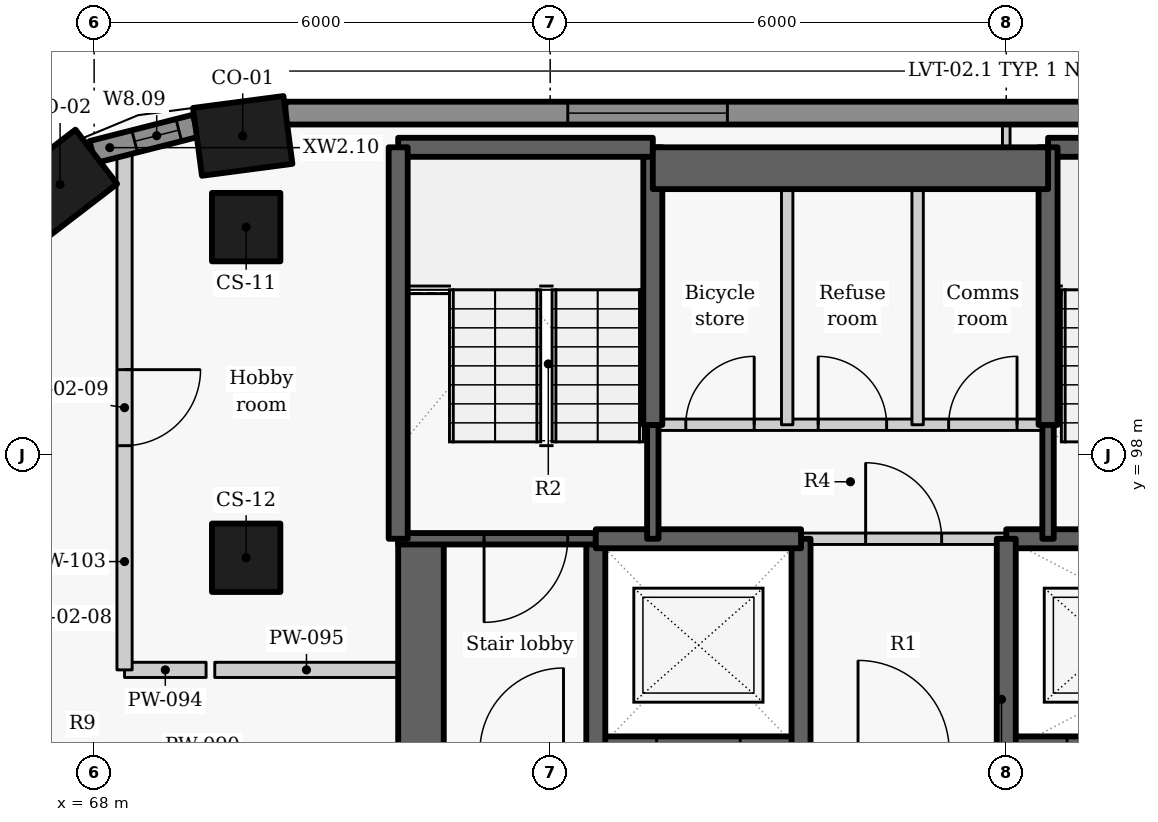
"""IFC4 building model, lengths in metres.
Left out: names, types, materials, properties, quantities, classifications, styles, units other than length and angle.
Written with IfcOpenShell. Run it as: python <this file> out.ifc"""

import sys

from ifc_helpers import new_model, si_unit, direction, frame, frame_2d, origin, origin_2d, place, context, subcontext, project, spatial, rectangle, extrude, element, fill, save


model = new_model("IFC4")
c1 = context("Model", 3, precision=1e-05, world=origin(), true_north=direction((0.0, 1.0)))
c2 = subcontext(c1, "Body", "Model", "MODEL_VIEW")
j1 = project(units=[si_unit("LENGTHUNIT", "METRE"), si_unit("PLANEANGLEUNIT", "RADIAN")], contexts=[c1])
p1 = place(None, origin())
s1 = spatial("IfcSite", under=j1, at=p1, CompositionType="ELEMENT")
p2 = place(p1, origin())
s2 = spatial("IfcBuilding", under=s1, at=p2, CompositionType="ELEMENT")
p3 = place(p2, frame((0.0, 0.0, 180.0)))
s3 = spatial("IfcBuildingStorey", under=s2, at=p3, CompositionType="ELEMENT", Elevation=180.0)
for number, where, z_axis, x_axis in (
    (1, (69.955, 102.2, 0.0), (0.0, 0.0, 1.0), (-0.991, -0.131, 0.0)),
    (2, (67.552, 101.56, 0.0), (0.0, 0.0, 1.0), (-0.793, -0.609, 0.0)),
):
    element("IfcColumn", number, at=place(p3, frame(where, z_axis=z_axis, x_axis=x_axis)), inside=s3, PredefinedType="COLUMN", context=c2, shape_type="SweptSolid", body=[
        extrude(rectangle(XDim=1.2, YDim=0.9, at=origin_2d()), origin(), (0.0, 0.0, 1.0), 3.3),
    ])
for number, where, z_axis, x_axis in (
    (3, (70.0, 101.0, 0.0), (0.0, 0.0, 1.0), (0.0, -1.0, 0.0)),
    (4, (70.0, 96.65, 0.0), (0.0, 0.0, 1.0), (0.0, -1.0, 0.0)),
):
    element("IfcColumn", number, at=place(p3, frame(where, z_axis=z_axis, x_axis=x_axis)), inside=s3, PredefinedType="COLUMN", context=c2, shape_type="SweptSolid", body=[
        extrude(rectangle(XDim=0.9, YDim=0.9, at=origin_2d()), origin(), (0.0, 0.0, 1.0), 3.3),
    ])
p4 = place(p3, frame((89.449, 102.5, 0.0), z_axis=(0.0, 0.0, 1.0), x_axis=(-1.0, 0.0, 0.0)))
e5 = element("IfcWall", 5, at=p4, inside=s3, PredefinedType="SOLIDWALL", context=c2, shape_type="SweptSolid", body=[
    extrude(rectangle(XDim=18.933, YDim=0.3, at=frame_2d((9.466, 0.0))), origin(), (0.0, 0.0, 1.0), 2.425),
])
p5 = place(p4, frame((3.687, 0.0, 0.9)))
e6 = element("IfcOpeningElement", 6, at=p5, cuts=e5, PredefinedType="OPENING", context=c2, shape_type="SweptSolid", body=[
    extrude(rectangle(XDim=2.1, YDim=1.1, at=frame_2d((1.05, 0.55))), frame((0.0, 0.16, 0.0), z_axis=(0.0, -1.0, 0.0), x_axis=(1.0, 0.0, 0.0)), (0.0, 0.0, 1.0), 0.32),
])
p6 = place(p4, frame((13.118, 0.0, 0.9)))
e7 = element("IfcOpeningElement", 7, at=p6, cuts=e5, PredefinedType="OPENING", context=c2, shape_type="SweptSolid", body=[
    extrude(rectangle(XDim=2.1, YDim=1.1, at=frame_2d((1.05, 0.55))), frame((0.0, 0.16, 0.0), z_axis=(0.0, -1.0, 0.0), x_axis=(1.0, 0.0, 0.0)), (0.0, 0.0, 1.0), 0.32),
])
p7 = place(p3, frame((69.336, 102.333, 0.0), z_axis=(0.0, 0.0, 1.0), x_axis=(-0.969037396898, -0.246914000036, 0.0)))
e8 = element("IfcWall", 8, at=p7, inside=s3, PredefinedType="SOLIDWALL", context=c2, shape_type="SweptSolid", body=[
    extrude(rectangle(XDim=1.403, YDim=0.3, at=frame_2d((0.702, 0.0))), origin(), (0.0, 0.0, 1.0), 2.425),
])
p8 = place(p7, frame((0.229, 0.0, 0.9)))
e9 = element("IfcOpeningElement", 9, at=p8, cuts=e8, PredefinedType="OPENING", context=c2, shape_type="SweptSolid", body=[
    extrude(rectangle(XDim=0.6, YDim=1.1, at=frame_2d((0.3, 0.55))), frame((0.0, 0.16, 0.0), z_axis=(0.0, -1.0, 0.0), x_axis=(1.0, 0.0, 0.0)), (0.0, 0.0, 1.0), 0.32),
])
p9 = place(p3, frame((72.3, 87.8, -0.275), z_axis=(0.0, 0.0, 1.0), x_axis=(0.0, 1.0, 0.0)))
e10 = element("IfcWall", 10, at=p9, inside=s3, PredefinedType="SHEAR", context=c2, shape_type="SweptSolid", body=[
    extrude(rectangle(XDim=9.1, YDim=0.6, at=frame_2d((4.55, 0.0))), origin(), (0.0, 0.0, 1.0), 3.3),
])
p10 = place(p9, frame((3.852, 0.0, 0.275)))
e11 = element("IfcOpeningElement", 11, at=p10, cuts=e10, PredefinedType="OPENING", context=c2, shape_type="SweptSolid", body=[
    extrude(rectangle(XDim=1.5, YDim=2.1, at=frame_2d((0.75, 1.05))), frame((0.0, 0.31, 0.0), z_axis=(0.0, -1.0, 0.0), x_axis=(1.0, 0.0, 0.0)), (0.0, 0.0, 1.0), 0.62),
])
p11 = place(p3, frame((74.597, 94.1, -0.275), z_axis=(0.0, 0.0, 1.0), x_axis=(1.0, 0.0, 0.0)))
e12 = element("IfcWall", 12, at=p11, inside=s3, PredefinedType="SHEAR", context=c2, shape_type="SweptSolid", body=[
    extrude(rectangle(XDim=2.706, YDim=0.4, at=frame_2d((1.353, 0.0))), origin(), (0.0, 0.0, 1.0), 3.3),
])
p12 = place(p11, frame((0.803, 0.0, 0.275)))
e13 = element("IfcOpeningElement", 13, at=p12, cuts=e12, PredefinedType="OPENING", context=c2, shape_type="SweptSolid", body=[
    extrude(rectangle(XDim=1.1, YDim=2.1, at=frame_2d((0.55, 1.05))), frame((0.0, 0.21, 0.0), z_axis=(0.0, -1.0, 0.0), x_axis=(1.0, 0.0, 0.0)), (0.0, 0.0, 1.0), 0.42),
])
p13 = place(p3, frame((79.997, 94.1, -0.275), z_axis=(0.0, 0.0, 1.0), x_axis=(1.0, 0.0, 0.0)))
e14 = element("IfcWall", 14, at=p13, inside=s3, PredefinedType="SHEAR", context=c2, shape_type="SweptSolid", body=[
    extrude(rectangle(XDim=5.406, YDim=0.4, at=frame_2d((2.703, 0.0))), origin(), (0.0, 0.0, 1.0), 3.3),
])
p14 = place(p13, frame((0.803, 0.0, 0.275)))
e15 = element("IfcOpeningElement", 15, at=p14, cuts=e14, PredefinedType="OPENING", context=c2, shape_type="SweptSolid", body=[
    extrude(rectangle(XDim=1.1, YDim=2.1, at=frame_2d((0.55, 1.05))), frame((0.0, 0.21, 0.0), z_axis=(0.0, -1.0, 0.0), x_axis=(1.0, 0.0, 0.0)), (0.0, 0.0, 1.0), 0.42),
])
p15 = place(p3, frame((74.6, 94.1, -0.275), z_axis=(0.0, 0.0, 1.0), x_axis=(0.0, 1.0, 0.0)))
e16 = element("IfcWall", 16, at=p15, inside=s3, PredefinedType="SHEAR", context=c2, shape_type="SweptSolid", body=[
    extrude(rectangle(XDim=2.8, YDim=0.25, at=frame_2d((1.4, 0.0))), origin(), (0.0, 0.0, 1.0), 3.3),
])
p16 = place(p3, frame((74.6, 96.9, -0.275), z_axis=(0.0, 0.0, 1.0), x_axis=(-1.0, 0.0, 0.0)))
e17 = element("IfcWall", 17, at=p16, inside=s3, PredefinedType="SHEAR", context=c2, shape_type="SweptSolid", body=[
    extrude(rectangle(XDim=2.6, YDim=0.15, at=frame_2d((1.3, 0.0))), origin(), (0.0, 0.0, 1.0), 3.3),
])
p17 = place(p16, frame((0.37, 0.0, 0.275)))
e18 = element("IfcOpeningElement", 18, at=p17, cuts=e17, PredefinedType="OPENING", context=c2, shape_type="SweptSolid", body=[
    extrude(rectangle(XDim=1.1, YDim=2.1, at=frame_2d((0.55, 1.05))), frame((0.0, 0.085, 0.0), z_axis=(0.0, -1.0, 0.0), x_axis=(1.0, 0.0, 0.0)), (0.0, 0.0, 1.0), 0.17),
])
p18 = place(p3, frame((77.3, 94.1, -0.275), z_axis=(0.0, 0.0, 1.0), x_axis=(0.0, 1.0, 0.0)))
e19 = element("IfcWall", 19, at=p18, inside=s3, PredefinedType="SHEAR", context=c2, shape_type="SweptSolid", body=[
    extrude(rectangle(XDim=2.8, YDim=0.25, at=frame_2d((1.4, 0.0))), origin(), (0.0, 0.0, 1.0), 3.3),
])
p19 = place(p3, frame((74.6, 96.9, -0.275), z_axis=(0.0, 0.0, 1.0), x_axis=(1.0, 0.0, 0.0)))
e20 = element("IfcWall", 20, at=p19, inside=s3, PredefinedType="SHEAR", context=c2, shape_type="SweptSolid", body=[
    extrude(rectangle(XDim=2.7, YDim=0.25, at=frame_2d((1.35, 0.0))), origin(), (0.0, 0.0, 1.0), 3.3),
])
p20 = place(p3, frame((80.0, 96.9, -0.275), z_axis=(0.0, 0.0, 1.0), x_axis=(1.0, 0.0, 0.0)))
e21 = element("IfcWall", 21, at=p20, inside=s3, PredefinedType="SHEAR", context=c2, shape_type="SweptSolid", body=[
    extrude(rectangle(XDim=8.0, YDim=0.25, at=frame_2d((4.0, 0.0))), origin(), (0.0, 0.0, 1.0), 3.3),
])
p21 = place(p20, frame((3.849, 0.0, 0.275)))
e22 = element("IfcOpeningElement", 22, at=p21, cuts=e21, PredefinedType="OPENING", context=c2, shape_type="SweptSolid", body=[
    extrude(rectangle(XDim=1.1, YDim=2.1, at=frame_2d((0.55, 1.05))), frame((0.0, 0.135, 0.0), z_axis=(0.0, -1.0, 0.0), x_axis=(1.0, 0.0, 0.0)), (0.0, 0.0, 1.0), 0.27),
])
p22 = place(p3, frame((80.0, 94.1, -0.275), z_axis=(0.0, 0.0, 1.0), x_axis=(0.0, 1.0, 0.0)))
e23 = element("IfcWall", 23, at=p22, inside=s3, PredefinedType="SHEAR", context=c2, shape_type="SweptSolid", body=[
    extrude(rectangle(XDim=2.8, YDim=0.25, at=frame_2d((1.4, 0.0))), origin(), (0.0, 0.0, 1.0), 3.3),
])
p23 = place(p3, frame((77.3, 96.9, 0.0), z_axis=(0.0, 0.0, 1.0), x_axis=(1.0, 0.0, 0.0)))
e24 = element("IfcWall", 24, at=p23, inside=s3, PredefinedType="PARTITIONING", context=c2, shape_type="SweptSolid", body=[
    extrude(rectangle(XDim=2.7, YDim=0.15, at=frame_2d((1.35, 0.0))), origin(), (0.0, 0.0, 1.0), 3.025),
])
p24 = place(p23, frame((0.85, 0.0, 0.0)))
e25 = element("IfcOpeningElement", 25, at=p24, cuts=e24, PredefinedType="OPENING", context=c2, shape_type="SweptSolid", body=[
    extrude(rectangle(XDim=1.0, YDim=2.1, at=frame_2d((0.5, 1.05))), frame((0.0, 0.085, 0.0), z_axis=(0.0, -1.0, 0.0), x_axis=(1.0, 0.0, 0.0)), (0.0, 0.0, 1.0), 0.17),
])
p25 = place(p3, frame((75.35, 96.9, -0.275), z_axis=(0.0, 0.0, 1.0), x_axis=(0.0, 1.0, 0.0)))
e26 = element("IfcWall", 26, at=p25, inside=s3, PredefinedType="SHEAR", context=c2, shape_type="SweptSolid", body=[
    extrude(rectangle(XDim=1.503, YDim=0.15, at=frame_2d((0.751, 0.0))), origin(), (0.0, 0.0, 1.0), 3.3),
])
p26 = place(p3, frame((75.35, 98.397, -0.275), z_axis=(0.0, 0.0, 1.0), x_axis=(0.0, 1.0, 0.0)))
e27 = element("IfcWall", 27, at=p26, inside=s3, PredefinedType="SHEAR", context=c2, shape_type="SweptSolid", body=[
    extrude(rectangle(XDim=3.653, YDim=0.25, at=frame_2d((1.827, 0.0))), origin(), (0.0, 0.0, 1.0), 3.3),
])
p27 = place(p3, frame((72.0, 102.05, -0.275), z_axis=(0.0, 0.0, 1.0), x_axis=(1.0, 0.0, 0.0)))
e28 = element("IfcWall", 28, at=p27, inside=s3, PredefinedType="SHEAR", context=c2, shape_type="SweptSolid", body=[
    extrude(rectangle(XDim=3.35, YDim=0.25, at=frame_2d((1.675, 0.0))), origin(), (0.0, 0.0, 1.0), 3.3),
])
p28 = place(p3, frame((80.55, 102.05, -0.275), z_axis=(0.0, 0.0, 1.0), x_axis=(1.0, 0.0, 0.0)))
e29 = element("IfcWall", 29, at=p28, inside=s3, PredefinedType="SHEAR", context=c2, shape_type="SweptSolid", body=[
    extrude(rectangle(XDim=2.85, YDim=0.25, at=frame_2d((1.425, 0.0))), origin(), (0.0, 0.0, 1.0), 3.3),
])
p29 = place(p3, frame((72.0, 96.9, -0.275), z_axis=(0.0, 0.0, 1.0), x_axis=(0.0, 1.0, 0.0)))
e30 = element("IfcWall", 30, at=p29, inside=s3, PredefinedType="SHEAR", context=c2, shape_type="SweptSolid", body=[
    extrude(rectangle(XDim=5.15, YDim=0.25, at=frame_2d((2.575, 0.0))), origin(), (0.0, 0.0, 1.0), 3.3),
])
p30 = place(p3, frame((80.55, 96.9, -0.275), z_axis=(0.0, 0.0, 1.0), x_axis=(0.0, 1.0, 0.0)))
e31 = element("IfcWall", 31, at=p30, inside=s3, PredefinedType="SHEAR", context=c2, shape_type="SweptSolid", body=[
    extrude(rectangle(XDim=1.503, YDim=0.15, at=frame_2d((0.751, 0.0))), origin(), (0.0, 0.0, 1.0), 3.3),
])
p31 = place(p3, frame((80.55, 98.397, -0.275), z_axis=(0.0, 0.0, 1.0), x_axis=(0.0, 1.0, 0.0)))
e32 = element("IfcWall", 32, at=p31, inside=s3, PredefinedType="SHEAR", context=c2, shape_type="SweptSolid", body=[
    extrude(rectangle(XDim=3.653, YDim=0.25, at=frame_2d((1.827, 0.0))), origin(), (0.0, 0.0, 1.0), 3.3),
])
p32 = place(p3, frame((75.35, 101.775, -0.275), z_axis=(0.0, 0.0, 1.0), x_axis=(1.0, 0.0, 0.0)))
e33 = element("IfcWall", 33, at=p32, inside=s3, PredefinedType="SHEAR", context=c2, shape_type="SweptSolid", body=[
    extrude(rectangle(XDim=5.2, YDim=0.55, at=frame_2d((2.6, 0.0))), origin(), (0.0, 0.0, 1.0), 3.3),
])
p33 = place(p3, frame((75.35, 98.4, 0.0), z_axis=(0.0, 0.0, 1.0), x_axis=(1.0, 0.0, 0.0)))
e34 = element("IfcWall", 34, at=p33, inside=s3, PredefinedType="PARTITIONING", context=c2, shape_type="SweptSolid", body=[
    extrude(rectangle(XDim=5.2, YDim=0.15, at=frame_2d((2.6, 0.0))), origin(), (0.0, 0.0, 1.0), 3.025),
])
p34 = place(p33, frame((0.434, 0.0, 0.0)))
e35 = element("IfcOpeningElement", 35, at=p34, cuts=e34, PredefinedType="OPENING", context=c2, shape_type="SweptSolid", body=[
    extrude(rectangle(XDim=0.9, YDim=2.1, at=frame_2d((0.45, 1.05))), frame((0.0, 0.085, 0.0), z_axis=(0.0, -1.0, 0.0), x_axis=(1.0, 0.0, 0.0)), (0.0, 0.0, 1.0), 0.17),
])
p35 = place(p33, frame((2.176, 0.0, 0.0)))
e36 = element("IfcOpeningElement", 36, at=p35, cuts=e34, PredefinedType="OPENING", context=c2, shape_type="SweptSolid", body=[
    extrude(rectangle(XDim=0.9, YDim=2.1, at=frame_2d((0.45, 1.05))), frame((0.0, 0.085, 0.0), z_axis=(0.0, -1.0, 0.0), x_axis=(1.0, 0.0, 0.0)), (0.0, 0.0, 1.0), 0.17),
])
p36 = place(p33, frame((3.892, 0.0, 0.0)))
e37 = element("IfcOpeningElement", 37, at=p36, cuts=e34, PredefinedType="OPENING", context=c2, shape_type="SweptSolid", body=[
    extrude(rectangle(XDim=0.9, YDim=2.1, at=frame_2d((0.45, 1.05))), frame((0.0, 0.085, 0.0), z_axis=(0.0, -1.0, 0.0), x_axis=(1.0, 0.0, 0.0)), (0.0, 0.0, 1.0), 0.17),
])
for number, where, z_axis, x_axis in (
    (38, (77.118, 98.4, 0.0), (0.0, 0.0, 1.0), (0.0, 1.0, 0.0)),
    (39, (78.834, 98.4, 0.0), (0.0, 0.0, 1.0), (0.0, 1.0, 0.0)),
):
    element("IfcWall", number, at=place(p3, frame(where, z_axis=z_axis, x_axis=x_axis)), inside=s3, PredefinedType="PARTITIONING", context=c2, shape_type="SweptSolid", body=[
        extrude(rectangle(XDim=3.65, YDim=0.15, at=frame_2d((1.825, 0.0))), origin(), (0.0, 0.0, 1.0), 3.025),
    ])
p37 = place(p3, frame((68.4, 95.175, 0.0), z_axis=(0.0, 0.0, 1.0), x_axis=(1.0, 0.0, 0.0)))
e40 = element("IfcWall", 40, at=p37, inside=s3, PredefinedType="PARTITIONING", context=c2, shape_type="SweptSolid", body=[
    extrude(rectangle(XDim=1.073, YDim=0.2, at=frame_2d((0.537, 0.0))), origin(), (0.0, 0.0, 1.0), 3.025),
])
p38 = place(p3, frame((69.587, 95.175, 0.0), z_axis=(0.0, 0.0, 1.0), x_axis=(1.0, 0.0, 0.0)))
e41 = element("IfcWall", 41, at=p38, inside=s3, PredefinedType="PARTITIONING", context=c2, shape_type="SweptSolid", body=[
    extrude(rectangle(XDim=2.413, YDim=0.2, at=frame_2d((1.207, 0.0))), origin(), (0.0, 0.0, 1.0), 2.505),
])
p39 = place(p3, frame((68.4, 102.074, 0.0), z_axis=(0.0, 0.0, 1.0), x_axis=(0.0, -1.0, 0.0)))
e42 = element("IfcWall", 42, at=p39, inside=s3, PredefinedType="PARTITIONING", context=c2, shape_type="SweptSolid", body=[
    extrude(rectangle(XDim=6.899, YDim=0.2, at=frame_2d((3.449, 0.0))), origin(), (0.0, 0.0, 1.0), 2.405),
])
p40 = place(p39, frame((2.949, 0.0, 0.0)))
e43 = element("IfcOpeningElement", 43, at=p40, cuts=e42, PredefinedType="OPENING", context=c2, shape_type="SweptSolid", body=[
    extrude(rectangle(XDim=1.0, YDim=2.1, at=frame_2d((0.5, 1.05))), frame((0.0, 0.11, 0.0), z_axis=(0.0, -1.0, 0.0), x_axis=(1.0, 0.0, 0.0)), (0.0, 0.0, 1.0), 0.22),
])
p41 = place(p3, frame((80.0, 102.05, 0.0), z_axis=(0.0, 0.0, 1.0), x_axis=(0.0, 1.0, 0.0)))
e44 = element("IfcWall", 44, at=p41, inside=s3, PredefinedType="PARTITIONING", context=c2, shape_type="SweptSolid", body=[
    extrude(rectangle(XDim=0.3, YDim=0.1, at=frame_2d((0.15, 0.0))), origin(), (0.0, 0.0, 1.0), 3.025),
])
p42 = place(p6, origin())
e45 = element("IfcWindow", 45, at=p42, inside=s3, PartitioningType="SINGLE_PANEL", PredefinedType="WINDOW", context=c2, shape_type="SweptSolid", body=[
    extrude(rectangle(XDim=2.1, YDim=1.1, at=frame_2d((1.05, 0.55))), frame((0.0, 0.03, 0.0), z_axis=(0.0, -1.0, 0.0), x_axis=(1.0, 0.0, 0.0)), (0.0, 0.0, 1.0), 0.06),
])
fill(e7, e45)
p43 = place(p8, origin())
e46 = element("IfcWindow", 46, at=p43, inside=s3, PartitioningType="SINGLE_PANEL", PredefinedType="WINDOW", context=c2, shape_type="SweptSolid", body=[
    extrude(rectangle(XDim=0.6, YDim=1.1, at=frame_2d((0.3, 0.55))), frame((0.0, 0.03, 0.0), z_axis=(0.0, -1.0, 0.0), x_axis=(1.0, 0.0, 0.0)), (0.0, 0.0, 1.0), 0.06),
])
fill(e9, e46)
p44 = place(p24, origin())
e47 = element("IfcDoor", 47, at=p44, inside=s3, OperationType="SINGLE_SWING_LEFT", PredefinedType="DOOR", context=c2, shape_type="SweptSolid", body=[
    extrude(rectangle(XDim=1.0, YDim=2.1, at=frame_2d((0.5, 1.05))), frame((0.0, 0.025, 0.0), z_axis=(0.0, -1.0, 0.0), x_axis=(1.0, 0.0, 0.0)), (0.0, 0.0, 1.0), 0.05),
])
fill(e25, e47)
p45 = place(p34, origin())
e48 = element("IfcDoor", 48, at=p45, inside=s3, OperationType="SINGLE_SWING_RIGHT", PredefinedType="DOOR", context=c2, shape_type="SweptSolid", body=[
    extrude(rectangle(XDim=0.9, YDim=2.1, at=frame_2d((0.45, 1.05))), frame((0.0, 0.025, 0.0), z_axis=(0.0, -1.0, 0.0), x_axis=(1.0, 0.0, 0.0)), (0.0, 0.0, 1.0), 0.05),
])
fill(e35, e48)
p46 = place(p35, origin())
e49 = element("IfcDoor", 49, at=p46, inside=s3, OperationType="SINGLE_SWING_LEFT", PredefinedType="DOOR", context=c2, shape_type="SweptSolid", body=[
    extrude(rectangle(XDim=0.9, YDim=2.1, at=frame_2d((0.45, 1.05))), frame((0.0, 0.025, 0.0), z_axis=(0.0, -1.0, 0.0), x_axis=(1.0, 0.0, 0.0)), (0.0, 0.0, 1.0), 0.05),
])
fill(e36, e49)
p47 = place(p36, origin())
e50 = element("IfcDoor", 50, at=p47, inside=s3, OperationType="SINGLE_SWING_RIGHT", PredefinedType="DOOR", context=c2, shape_type="SweptSolid", body=[
    extrude(rectangle(XDim=0.9, YDim=2.1, at=frame_2d((0.45, 1.05))), frame((0.0, 0.025, 0.0), z_axis=(0.0, -1.0, 0.0), x_axis=(1.0, 0.0, 0.0)), (0.0, 0.0, 1.0), 0.05),
])
fill(e37, e50)
p48 = place(p17, origin())
e51 = element("IfcDoor", 51, at=p48, inside=s3, OperationType="SINGLE_SWING_RIGHT", PredefinedType="DOOR", context=c2, shape_type="SweptSolid", body=[
    extrude(rectangle(XDim=1.1, YDim=2.1, at=frame_2d((0.55, 1.05))), frame((0.0, 0.025, 0.0), z_axis=(0.0, -1.0, 0.0), x_axis=(1.0, 0.0, 0.0)), (0.0, 0.0, 1.0), 0.05),
])
fill(e18, e51)
p49 = place(p40, origin())
e52 = element("IfcDoor", 52, at=p49, inside=s3, OperationType="SINGLE_SWING_LEFT", PredefinedType="DOOR", context=c2, shape_type="SweptSolid", body=[
    extrude(rectangle(XDim=1.0, YDim=2.1, at=frame_2d((0.5, 1.05))), frame((0.0, 0.025, 0.0), z_axis=(0.0, -1.0, 0.0), x_axis=(1.0, 0.0, 0.0)), (0.0, 0.0, 1.0), 0.05),
])
fill(e43, e52)
save(model, sys.argv[1])
